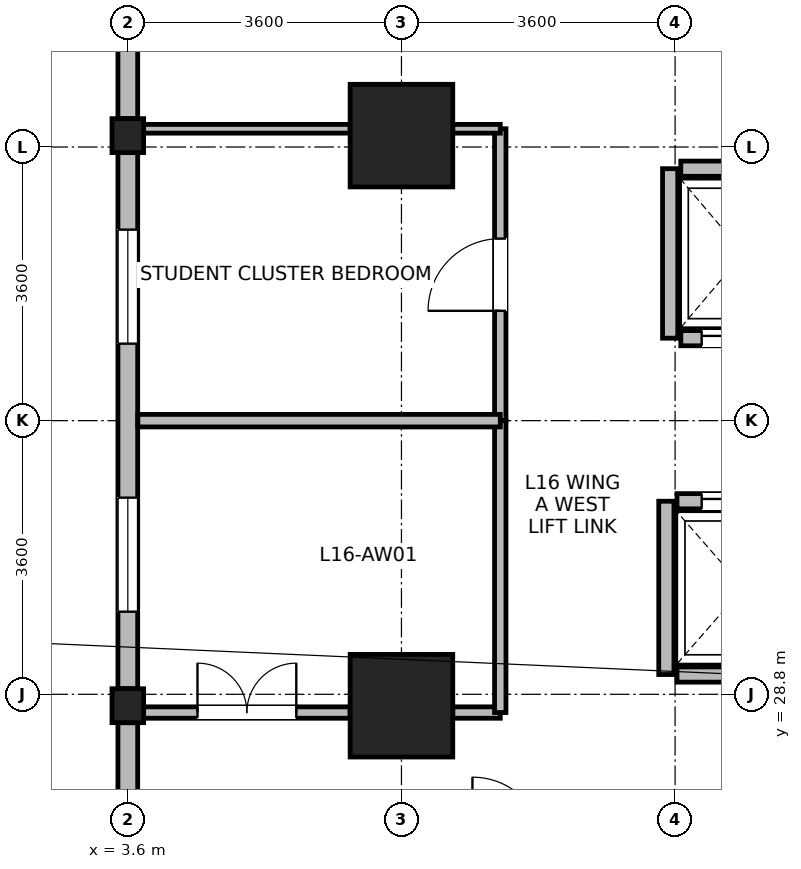
"""IFC4 building model, lengths in metres.
Left out: names, types, materials, properties, quantities, classifications, styles, units other than length and angle.
Written with IfcOpenShell. Run it as: python <this file> out.ifc"""

import sys

from ifc_helpers import new_model, si_unit, direction, frame, frame_2d, origin, origin_2d, place, context, subcontext, project, spatial, rectangle, i_section, extrude, source, transform, mapped, element, fill, save


model = new_model("IFC4")
c1 = context("Model", 3, precision=1e-05, world=origin(), true_north=direction((0.0, 1.0)))
c2 = subcontext(c1, "Body", "Model", "MODEL_VIEW")
j1 = project(units=[si_unit("LENGTHUNIT", "METRE"), si_unit("PLANEANGLEUNIT", "RADIAN")], contexts=[c1])
p1 = place(None, origin())
s1 = spatial("IfcSite", under=j1, at=p1, CompositionType="ELEMENT")
p2 = place(p1, origin())
s2 = spatial("IfcBuilding", under=s1, at=p2, CompositionType="ELEMENT")
p3 = place(p2, frame((0.0, 0.0, 66.0)))
s3 = spatial("IfcBuildingStorey", under=s2, at=p3, CompositionType="ELEMENT", Elevation=66.0)
m1 = source(origin(), c2, "Body", "SweptSolid", [
    extrude(rectangle(XDim=1.35, YDim=1.35, at=origin_2d()), origin(), (0.0, 0.0, 1.0), 3.7),
])
for number, where, z_axis, x_axis in (
    (1, (7.2, 28.65, 0.0), (0.0, 0.0, 1.0), (1.0, 0.0, 0.0)),
    (2, (7.2, 36.15, 0.0), (0.0, 0.0, 1.0), (1.0, 0.0, 0.0)),
):
    element("IfcColumn", number, at=place(p3, frame(where, z_axis=z_axis, x_axis=x_axis)), inside=s3, PredefinedType="COLUMN", context=c2, shape_type="MappedRepresentation", body=[
        mapped(m1, transform((0.0, 0.0, 0.0), x_axis=(1.0, 0.0, 0.0), y_axis=(0.0, 1.0, 0.0), z_axis=(0.0, 0.0, 1.0), scale=1.0)),
    ])
m2 = source(origin(), c2, "Body", "SweptSolid", [
    extrude(i_section(OverallWidth=0.416, OverallDepth=0.446, WebThickness=0.029, FlangeThickness=0.04, FilletRadius=0.015, at=origin_2d()), origin(), (0.0, 0.0, 1.0), 3.7),
])
for number, where, z_axis, x_axis in (
    (3, (3.6, 28.65, 0.0), (0.0, 0.0, 1.0), (1.0, 0.0, 0.0)),
    (4, (3.6, 36.15, 0.0), (0.0, 0.0, 1.0), (1.0, 0.0, 0.0)),
):
    element("IfcColumn", number, at=place(p3, frame(where, z_axis=z_axis, x_axis=x_axis)), inside=s3, PredefinedType="COLUMN", context=c2, shape_type="MappedRepresentation", body=[
        mapped(m2, transform((0.0, 0.0, 0.0), x_axis=(1.0, 0.0, 0.0), y_axis=(0.0, 1.0, 0.0), z_axis=(0.0, 0.0, 1.0), scale=1.0)),
    ])
p4 = place(p3, frame((3.6, 36.374, 0.0), z_axis=(0.0, 0.0, 1.0), x_axis=(0.0, 1.0, 0.0)))
e5 = element("IfcWall", 5, at=p4, inside=s3, PredefinedType="STANDARD", context=c2, shape_type="SweptSolid", body=[
    extrude(rectangle(XDim=3.356, YDim=0.26, at=frame_2d((1.678, 0.0))), origin(), (0.0, 0.0, 1.0), 3.43),
])
p5 = place(p4, frame((0.928, 0.0, 0.85)))
e6 = element("IfcOpeningElement", 6, at=p5, cuts=e5, PredefinedType="OPENING", context=c2, shape_type="SweptSolid", body=[
    extrude(rectangle(XDim=1.5, YDim=1.85, at=frame_2d((0.75, 0.925))), frame((0.0, 0.14, 0.0), z_axis=(0.0, -1.0, 0.0), x_axis=(1.0, 0.0, 0.0)), (0.0, 0.0, 1.0), 0.28),
])
p6 = place(p3, frame((3.6, 28.874, 0.0), z_axis=(0.0, 0.0, 1.0), x_axis=(0.0, 1.0, 0.0)))
e7 = element("IfcWall", 7, at=p6, inside=s3, PredefinedType="STANDARD", context=c2, shape_type="SweptSolid", body=[
    extrude(rectangle(XDim=7.052, YDim=0.26, at=frame_2d((3.526, 0.0))), origin(), (0.0, 0.0, 1.0), 2.93),
])
p7 = place(p6, frame((1.013, 0.0, 0.85)))
e8 = element("IfcOpeningElement", 8, at=p7, cuts=e7, PredefinedType="OPENING", context=c2, shape_type="SweptSolid", body=[
    extrude(rectangle(XDim=1.5, YDim=1.85, at=frame_2d((0.75, 0.925))), frame((0.0, 0.14, 0.0), z_axis=(0.0, -1.0, 0.0), x_axis=(1.0, 0.0, 0.0)), (0.0, 0.0, 1.0), 0.28),
])
p8 = place(p6, frame((4.539, 0.0, 0.85)))
e9 = element("IfcOpeningElement", 9, at=p8, cuts=e7, PredefinedType="OPENING", context=c2, shape_type="SweptSolid", body=[
    extrude(rectangle(XDim=1.5, YDim=1.85, at=frame_2d((0.75, 0.925))), frame((0.0, 0.14, 0.0), z_axis=(0.0, -1.0, 0.0), x_axis=(1.0, 0.0, 0.0)), (0.0, 0.0, 1.0), 0.28),
])
p9 = place(p3, frame((3.6, 21.47, 0.0), z_axis=(0.0, 0.0, 1.0), x_axis=(0.0, 1.0, 0.0)))
e10 = element("IfcWall", 10, at=p9, inside=s3, PredefinedType="STANDARD", context=c2, shape_type="SweptSolid", body=[
    extrude(rectangle(XDim=6.956, YDim=0.26, at=frame_2d((3.478, 0.0))), origin(), (0.0, 0.0, 1.0), 3.43),
])
p10 = place(p9, frame((0.989, 0.0, 0.85)))
e11 = element("IfcOpeningElement", 11, at=p10, cuts=e10, PredefinedType="OPENING", context=c2, shape_type="SweptSolid", body=[
    extrude(rectangle(XDim=1.5, YDim=1.85, at=frame_2d((0.75, 0.925))), frame((0.0, 0.14, 0.0), z_axis=(0.0, -1.0, 0.0), x_axis=(1.0, 0.0, 0.0)), (0.0, 0.0, 1.0), 0.28),
])
p11 = place(p9, frame((3.003, 0.0, 0.85)))
e12 = element("IfcOpeningElement", 12, at=p11, cuts=e10, PredefinedType="OPENING", context=c2, shape_type="SweptSolid", body=[
    extrude(rectangle(XDim=0.95, YDim=1.75, at=frame_2d((0.475, 0.875))), frame((0.0, 0.14, 0.0), z_axis=(0.0, -1.0, 0.0), x_axis=(1.0, 0.0, 0.0)), (0.0, 0.0, 1.0), 0.28),
])
p12 = place(p3, frame((10.825, 29.06, 0.0), z_axis=(0.0, 0.0, 1.0), x_axis=(1.0, 0.0, 0.0)))
e13 = element("IfcWall", 13, at=p12, inside=s3, PredefinedType="PARTITIONING", context=c2, shape_type="SweptSolid", body=[
    extrude(rectangle(XDim=1.75, YDim=0.2, at=frame_2d((0.875, 0.0))), origin(), (0.0, 0.0, 1.0), 3.43),
])
p13 = place(p3, frame((10.825, 31.34, 0.0), z_axis=(0.0, 0.0, 1.0), x_axis=(1.0, 0.0, 0.0)))
e14 = element("IfcWall", 14, at=p13, inside=s3, PredefinedType="PARTITIONING", context=c2, shape_type="SweptSolid", body=[
    extrude(rectangle(XDim=1.75, YDim=0.2, at=frame_2d((0.875, 0.0))), origin(), (0.0, 0.0, 1.0), 3.43),
])
p14 = place(p13, frame((0.325, 0.0, 0.0)))
e15 = element("IfcOpeningElement", 15, at=p14, cuts=e14, PredefinedType="OPENING", context=c2, shape_type="SweptSolid", body=[
    extrude(rectangle(XDim=1.1, YDim=2.12, at=frame_2d((0.55, 1.06))), frame((0.0, 0.11, 0.0), z_axis=(0.0, -1.0, 0.0), x_axis=(1.0, 0.0, 0.0)), (0.0, 0.0, 1.0), 0.22),
])
p15 = place(p3, frame((10.685, 29.06, 0.0), z_axis=(0.0, 0.0, 1.0), x_axis=(0.0, 1.0, 0.0)))
e16 = element("IfcWall", 16, at=p15, inside=s3, PredefinedType="PARTITIONING", context=c2, shape_type="SweptSolid", body=[
    extrude(rectangle(XDim=2.28, YDim=0.2, at=frame_2d((1.14, 0.0))), origin(), (0.0, 0.0, 1.0), 3.43),
])
p16 = place(p3, frame((10.875, 33.485, 0.0), z_axis=(0.0, 0.0, 1.0), x_axis=(1.0, 0.0, 0.0)))
e17 = element("IfcWall", 17, at=p16, inside=s3, PredefinedType="PARTITIONING", context=c2, shape_type="SweptSolid", body=[
    extrude(rectangle(XDim=1.65, YDim=0.2, at=frame_2d((0.825, 0.0))), origin(), (0.0, 0.0, 1.0), 3.43),
])
p17 = place(p16, frame((0.275, 0.0, 0.0)))
e18 = element("IfcOpeningElement", 18, at=p17, cuts=e17, PredefinedType="OPENING", context=c2, shape_type="SweptSolid", body=[
    extrude(rectangle(XDim=1.1, YDim=2.12, at=frame_2d((0.55, 1.06))), frame((0.0, 0.11, 0.0), z_axis=(0.0, -1.0, 0.0), x_axis=(1.0, 0.0, 0.0)), (0.0, 0.0, 1.0), 0.22),
])
p18 = place(p3, frame((10.875, 35.715, 0.0), z_axis=(0.0, 0.0, 1.0), x_axis=(1.0, 0.0, 0.0)))
e19 = element("IfcWall", 19, at=p18, inside=s3, PredefinedType="PARTITIONING", context=c2, shape_type="SweptSolid", body=[
    extrude(rectangle(XDim=1.65, YDim=0.2, at=frame_2d((0.825, 0.0))), origin(), (0.0, 0.0, 1.0), 3.43),
])
p19 = place(p3, frame((10.735, 33.485, 0.0), z_axis=(0.0, 0.0, 1.0), x_axis=(0.0, 1.0, 0.0)))
e20 = element("IfcWall", 20, at=p19, inside=s3, PredefinedType="PARTITIONING", context=c2, shape_type="SweptSolid", body=[
    extrude(rectangle(XDim=2.23, YDim=0.2, at=frame_2d((1.115, 0.0))), origin(), (0.0, 0.0, 1.0), 3.43),
])
p20 = place(p3, frame((3.808, 28.56, 0.0), z_axis=(0.0, 0.0, 1.0), x_axis=(1.0, 0.0, 0.0)))
e21 = element("IfcWall", 21, at=p20, inside=s3, PredefinedType="PARTITIONING", context=c2, shape_type="SweptSolid", body=[
    extrude(rectangle(XDim=2.717, YDim=0.15, at=frame_2d((1.358, 0.0))), origin(), (0.0, 0.0, 1.0), 2.78),
])
p21 = place(p20, frame((0.708, 0.0, 0.0)))
e22 = element("IfcOpeningElement", 22, at=p21, cuts=e21, PredefinedType="OPENING", context=c2, shape_type="SweptSolid", body=[
    extrude(rectangle(XDim=1.3, YDim=2.12, at=frame_2d((0.65, 1.06))), frame((0.0, 0.085, 0.0), z_axis=(0.0, -1.0, 0.0), x_axis=(1.0, 0.0, 0.0)), (0.0, 0.0, 1.0), 0.17),
])
p22 = place(p3, frame((7.875, 28.56, 0.0), z_axis=(0.0, 0.0, 1.0), x_axis=(1.0, 0.0, 0.0)))
e23 = element("IfcWall", 23, at=p22, inside=s3, PredefinedType="PARTITIONING", context=c2, shape_type="SweptSolid", body=[
    extrude(rectangle(XDim=0.625, YDim=0.15, at=frame_2d((0.312, 0.0))), origin(), (0.0, 0.0, 1.0), 2.78),
])
p23 = place(p3, frame((8.5, 32.4, 0.0), z_axis=(0.0, 0.0, 1.0), x_axis=(0.0, 1.0, 0.0)))
e24 = element("IfcWall", 24, at=p23, inside=s3, PredefinedType="PARTITIONING", context=c2, shape_type="SweptSolid", body=[
    extrude(rectangle(XDim=3.84, YDim=0.15, at=frame_2d((1.92, 0.0))), origin(), (0.0, 0.0, 1.0), 3.43),
])
p24 = place(p23, frame((1.445, 0.0, 0.0)))
e25 = element("IfcOpeningElement", 25, at=p24, cuts=e24, PredefinedType="OPENING", context=c2, shape_type="SweptSolid", body=[
    extrude(rectangle(XDim=0.95, YDim=2.1, at=frame_2d((0.475, 1.05))), frame((0.0, 0.085, 0.0), z_axis=(0.0, -1.0, 0.0), x_axis=(1.0, 0.0, 0.0)), (0.0, 0.0, 1.0), 0.17),
])
p25 = place(p3, frame((8.5, 28.56, 0.0), z_axis=(0.0, 0.0, 1.0), x_axis=(0.0, 1.0, 0.0)))
e26 = element("IfcWall", 26, at=p25, inside=s3, PredefinedType="PARTITIONING", context=c2, shape_type="SweptSolid", body=[
    extrude(rectangle(XDim=3.84, YDim=0.15, at=frame_2d((1.92, 0.0))), origin(), (0.0, 0.0, 1.0), 3.43),
])
p26 = place(p3, frame((3.732, 32.4, 0.0), z_axis=(0.0, 0.0, 1.0), x_axis=(1.0, 0.0, 0.0)))
e27 = element("IfcWall", 27, at=p26, inside=s3, PredefinedType="PARTITIONING", context=c2, shape_type="SweptSolid", body=[
    extrude(rectangle(XDim=4.768, YDim=0.165, at=frame_2d((2.384, 0.0))), origin(), (0.0, 0.0, 1.0), 3.43),
])
p27 = place(p3, frame((3.808, 36.24, 0.0), z_axis=(0.0, 0.0, 1.0), x_axis=(1.0, 0.0, 0.0)))
e28 = element("IfcWall", 28, at=p27, inside=s3, PredefinedType="PARTITIONING", context=c2, shape_type="SweptSolid", body=[
    extrude(rectangle(XDim=2.717, YDim=0.115, at=frame_2d((1.358, 0.0))), origin(), (0.0, 0.0, 1.0), 2.78),
])
p28 = place(p3, frame((7.875, 36.24, 0.0), z_axis=(0.0, 0.0, 1.0), x_axis=(1.0, 0.0, 0.0)))
e29 = element("IfcWall", 29, at=p28, inside=s3, PredefinedType="PARTITIONING", context=c2, shape_type="SweptSolid", body=[
    extrude(rectangle(XDim=0.625, YDim=0.115, at=frame_2d((0.312, 0.0))), origin(), (0.0, 0.0, 1.0), 2.78),
])
p29 = place(p7, origin())
e30 = element("IfcWindow", 30, at=p29, inside=s3, PartitioningType="SINGLE_PANEL", PredefinedType="WINDOW", context=c2, shape_type="SweptSolid", body=[
    extrude(rectangle(XDim=1.5, YDim=1.85, at=frame_2d((0.75, 0.925))), frame((0.0, 0.03, 0.0), z_axis=(0.0, -1.0, 0.0), x_axis=(1.0, 0.0, 0.0)), (0.0, 0.0, 1.0), 0.06),
])
fill(e8, e30)
p30 = place(p8, origin())
e31 = element("IfcWindow", 31, at=p30, inside=s3, PartitioningType="SINGLE_PANEL", PredefinedType="WINDOW", context=c2, shape_type="SweptSolid", body=[
    extrude(rectangle(XDim=1.5, YDim=1.85, at=frame_2d((0.75, 0.925))), frame((0.0, 0.03, 0.0), z_axis=(0.0, -1.0, 0.0), x_axis=(1.0, 0.0, 0.0)), (0.0, 0.0, 1.0), 0.06),
])
fill(e9, e31)
p31 = place(p14, origin())
e32 = element("IfcDoor", 32, at=p31, inside=s3, OperationType="SLIDING_TO_LEFT", PredefinedType="DOOR", context=c2, shape_type="SweptSolid", body=[
    extrude(rectangle(XDim=1.1, YDim=2.12, at=frame_2d((0.55, 1.06))), frame((0.0, 0.025, 0.0), z_axis=(0.0, -1.0, 0.0), x_axis=(1.0, 0.0, 0.0)), (0.0, 0.0, 1.0), 0.05),
])
fill(e15, e32)
p32 = place(p17, origin())
e33 = element("IfcDoor", 33, at=p32, inside=s3, OperationType="SLIDING_TO_LEFT", PredefinedType="DOOR", context=c2, shape_type="SweptSolid", body=[
    extrude(rectangle(XDim=1.1, YDim=2.12, at=frame_2d((0.55, 1.06))), frame((0.0, 0.025, 0.0), z_axis=(0.0, -1.0, 0.0), x_axis=(1.0, 0.0, 0.0)), (0.0, 0.0, 1.0), 0.05),
])
fill(e18, e33)
p33 = place(p21, origin())
e34 = element("IfcDoor", 34, at=p33, inside=s3, OperationType="DOUBLE_DOOR_SINGLE_SWING", PredefinedType="DOOR", context=c2, shape_type="SweptSolid", body=[
    extrude(rectangle(XDim=1.3, YDim=2.12, at=frame_2d((0.65, 1.06))), frame((0.0, 0.025, 0.0), z_axis=(0.0, -1.0, 0.0), x_axis=(1.0, 0.0, 0.0)), (0.0, 0.0, 1.0), 0.05),
])
fill(e22, e34)
p34 = place(p24, origin())
e35 = element("IfcDoor", 35, at=p34, inside=s3, OperationType="SINGLE_SWING_LEFT", PredefinedType="DOOR", context=c2, shape_type="SweptSolid", body=[
    extrude(rectangle(XDim=0.95, YDim=2.1, at=frame_2d((0.475, 1.05))), frame((0.0, 0.025, 0.0), z_axis=(0.0, -1.0, 0.0), x_axis=(1.0, 0.0, 0.0)), (0.0, 0.0, 1.0), 0.05),
])
fill(e25, e35)
save(model, sys.argv[1])
